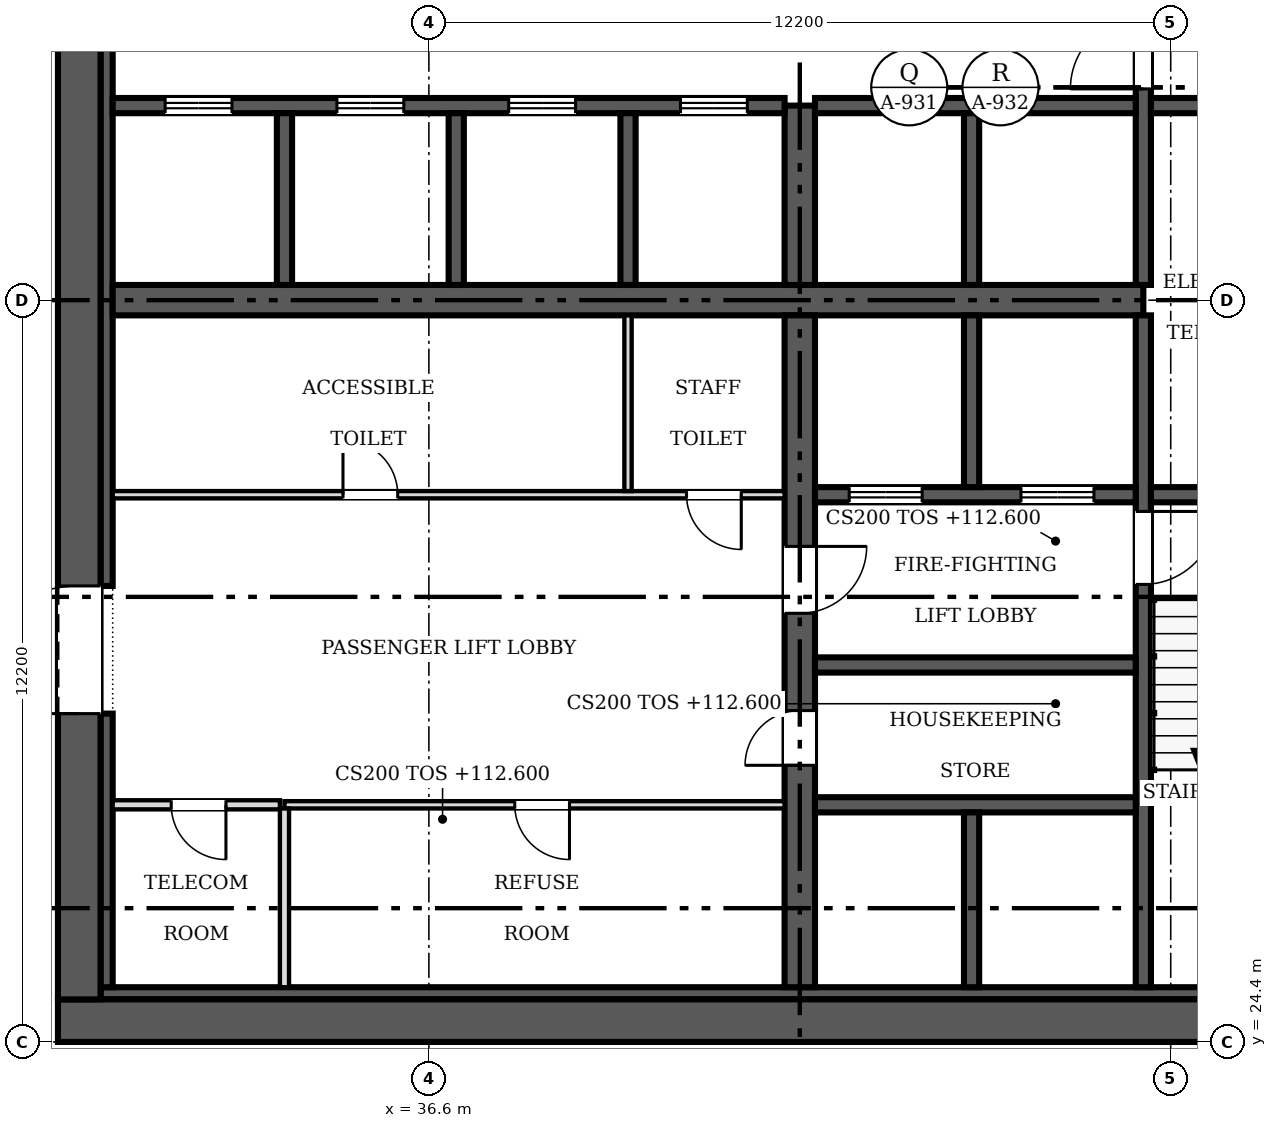
"""IFC4 building model, lengths in metres.
Left out: names, types, materials, properties, quantities, classifications, styles, units other than length and angle.
Written with IfcOpenShell. Run it as: python <this file> out.ifc"""

import sys

from ifc_helpers import new_model, si_unit, direction, frame, frame_2d, origin, place, context, subcontext, project, spatial, rectangle, extrude, source, transform, mapped, element, fill, save


model = new_model("IFC4")
c1 = context("Model", 3, precision=1e-05, world=origin(), true_north=direction((0.0, 1.0)))
c2 = subcontext(c1, "Body", "Model", "MODEL_VIEW")
j1 = project(units=[si_unit("LENGTHUNIT", "METRE"), si_unit("PLANEANGLEUNIT", "RADIAN")], contexts=[c1])
p1 = place(None, origin())
s1 = spatial("IfcSite", under=j1, at=p1, CompositionType="ELEMENT")
p2 = place(p1, origin())
s2 = spatial("IfcBuilding", under=s1, at=p2, CompositionType="ELEMENT")
p3 = place(p2, frame((0.0, 0.0, 112.6)))
s3 = spatial("IfcBuildingStorey", under=s2, at=p3, CompositionType="ELEMENT", Elevation=112.6)
p4 = place(p3, frame((54.9, 24.75, 0.0), z_axis=(0.0, 0.0, 1.0), x_axis=(-1.0, 0.0, 0.0)))
e1 = element("IfcWall", 1, at=p4, inside=s3, PredefinedType="SHEAR", context=c2, shape_type="SweptSolid", body=[
    extrude(rectangle(XDim=24.4, YDim=0.7, at=frame_2d((12.2, 0.0))), origin(), (0.0, 0.0, 1.0), 3.8),
])
m1 = source(origin(), c2, "Body", "SweptSolid", [
    extrude(rectangle(XDim=1.2, YDim=2.1, at=frame_2d((0.6, 1.05))), frame((0.0, 0.36, 0.0), z_axis=(0.0, -1.0, 0.0), x_axis=(1.0, 0.0, 0.0)), (0.0, 0.0, 1.0), 0.72),
])
p5 = place(p4, frame((1.5, 0.0, 0.0)))
e2 = element("IfcOpeningElement", 2, at=p5, cuts=e1, PredefinedType="OPENING", context=c2, shape_type="MappedRepresentation", body=[
    mapped(m1, transform((0.0, 0.0, 0.0), scale=1.0)),
])
p6 = place(p3, frame((30.85, 25.1, 0.0), z_axis=(0.0, 0.0, 1.0), x_axis=(0.0, 1.0, 0.0)))
e3 = element("IfcWall", 3, at=p6, inside=s3, PredefinedType="SHEAR", context=c2, shape_type="SweptSolid", body=[
    extrude(rectangle(XDim=23.0, YDim=0.7, at=frame_2d((11.5, 0.0))), origin(), (0.0, 0.0, 1.0), 3.8),
])
m2 = source(origin(), c2, "Body", "SweptSolid", [
    extrude(rectangle(XDim=2.1, YDim=2.4, at=frame_2d((1.05, 1.2))), frame((0.0, 0.36, 0.0), z_axis=(0.0, -1.0, 0.0), x_axis=(1.0, 0.0, 0.0)), (0.0, 0.0, 1.0), 0.72),
])
p7 = place(p6, frame((4.7, 0.0, 0.0)))
e4 = element("IfcOpeningElement", 4, at=p7, cuts=e3, PredefinedType="OPENING", context=c2, shape_type="MappedRepresentation", body=[
    mapped(m2, transform((0.0, 0.0, 0.0), scale=1.0)),
])
p8 = place(p6, frame((16.2, 0.0, 0.0)))
e5 = element("IfcOpeningElement", 5, at=p8, cuts=e3, PredefinedType="OPENING", context=c2, shape_type="MappedRepresentation", body=[
    mapped(m2, transform((0.0, 0.0, 0.0), scale=1.0)),
])
p9 = place(p3, frame((31.2, 25.2, 0.0), z_axis=(0.0, 0.0, 1.0), x_axis=(1.0, 0.0, 0.0)))
e6 = element("IfcWall", 6, at=p9, inside=s3, PredefinedType="SOLIDWALL", context=c2, shape_type="SweptSolid", body=[
    extrude(rectangle(XDim=21.0, YDim=0.2, at=frame_2d((10.5, 0.0))), origin(), (0.0, 0.0, 1.0), 3.8),
])
p10 = place(p3, frame((31.3, 25.3, 0.0), z_axis=(0.0, 0.0, 1.0), x_axis=(0.0, 1.0, 0.0)))
e7 = element("IfcWall", 7, at=p10, inside=s3, PredefinedType="SOLIDWALL", context=c2, shape_type="SweptSolid", body=[
    extrude(rectangle(XDim=4.5, YDim=0.2, at=frame_2d((2.25, 0.0))), origin(), (0.0, 0.0, 1.0), 3.8),
])
p11 = place(p3, frame((31.3, 31.9, 0.0), z_axis=(0.0, 0.0, 1.0), x_axis=(0.0, 1.0, 0.0)))
e8 = element("IfcWall", 8, at=p11, inside=s3, PredefinedType="SOLIDWALL", context=c2, shape_type="SweptSolid", body=[
    extrude(rectangle(XDim=9.4, YDim=0.2, at=frame_2d((4.7, 0.0))), origin(), (0.0, 0.0, 1.0), 3.8),
])
p12 = place(p3, frame((31.4, 36.6, 0.0), z_axis=(0.0, 0.0, 1.0), x_axis=(1.0, 0.0, 0.0)))
e9 = element("IfcWall", 9, at=p12, inside=s3, PredefinedType="SHEAR", context=c2, shape_type="SweptSolid", body=[
    extrude(rectangle(XDim=16.95, YDim=0.5, at=frame_2d((8.475, 0.0))), origin(), (0.0, 0.0, 1.0), 3.8),
])
p13 = place(p3, frame((42.7, 36.35, 0.0), z_axis=(0.0, 0.0, 1.0), x_axis=(0.0, -1.0, 0.0)))
e10 = element("IfcWall", 10, at=p13, inside=s3, PredefinedType="SHEAR", context=c2, shape_type="SweptSolid", body=[
    extrude(rectangle(XDim=11.05, YDim=0.5, at=frame_2d((5.525, 0.0))), origin(), (0.0, 0.0, 1.0), 3.8),
])
m3 = source(origin(), c2, "Body", "SweptSolid", [
    extrude(rectangle(XDim=0.9, YDim=2.1, at=frame_2d((0.45, 1.05))), frame((0.0, 0.26, 0.0), z_axis=(0.0, -1.0, 0.0), x_axis=(1.0, 0.0, 0.0)), (0.0, 0.0, 1.0), 0.52),
])
p14 = place(p13, frame((6.5, 0.0, 0.0)))
e11 = element("IfcOpeningElement", 11, at=p14, cuts=e10, PredefinedType="OPENING", context=c2, shape_type="MappedRepresentation", body=[
    mapped(m3, transform((0.0, 0.0, 0.0), scale=1.0)),
])
m4 = source(origin(), c2, "Body", "SweptSolid", [
    extrude(rectangle(XDim=1.1, YDim=2.1, at=frame_2d((0.55, 1.05))), frame((0.0, 0.26, 0.0), z_axis=(0.0, -1.0, 0.0), x_axis=(1.0, 0.0, 0.0)), (0.0, 0.0, 1.0), 0.52),
])
p15 = place(p13, frame((3.8, 0.0, 0.0)))
e12 = element("IfcOpeningElement", 12, at=p15, cuts=e10, PredefinedType="OPENING", context=c2, shape_type="MappedRepresentation", body=[
    mapped(m4, transform((0.0, 0.0, 0.0), scale=1.0)),
])
p16 = place(p3, frame((42.7, 36.85, 0.0), z_axis=(0.0, 0.0, 1.0), x_axis=(0.0, 1.0, 0.0)))
e13 = element("IfcWall", 13, at=p16, inside=s3, PredefinedType="SHEAR", context=c2, shape_type="SweptSolid", body=[
    extrude(rectangle(XDim=2.95, YDim=0.5, at=frame_2d((1.475, 0.0))), origin(), (0.0, 0.0, 1.0), 3.8),
])
p17 = place(p3, frame((48.35, 36.35, 0.0), z_axis=(0.0, 0.0, 1.0), x_axis=(0.0, -1.0, 0.0)))
e14 = element("IfcWall", 14, at=p17, inside=s3, PredefinedType="SOLIDWALL", context=c2, shape_type="SweptSolid", body=[
    extrude(rectangle(XDim=11.05, YDim=0.25, at=frame_2d((5.525, 0.0))), origin(), (0.0, 0.0, 1.0), 3.8),
])
m5 = source(origin(), c2, "Body", "SweptSolid", [
    extrude(rectangle(XDim=1.2, YDim=2.1, at=frame_2d((0.6, 1.05))), frame((0.0, 0.135, 0.0), z_axis=(0.0, -1.0, 0.0), x_axis=(1.0, 0.0, 0.0)), (0.0, 0.0, 1.0), 0.27),
])
p18 = place(p17, frame((3.225, 0.0, 0.0)))
e15 = element("IfcOpeningElement", 15, at=p18, cuts=e14, PredefinedType="OPENING", context=c2, shape_type="MappedRepresentation", body=[
    mapped(m5, transform((0.0, 0.0, 0.0), scale=1.0)),
])
p19 = place(p3, frame((48.35, 47.9, 0.0), z_axis=(0.0, 0.0, 1.0), x_axis=(0.0, -1.0, 0.0)))
e16 = element("IfcWall", 16, at=p19, inside=s3, PredefinedType="SOLIDWALL", context=c2, shape_type="SweptSolid", body=[
    extrude(rectangle(XDim=11.05, YDim=0.25, at=frame_2d((5.525, 0.0))), origin(), (0.0, 0.0, 1.0), 3.8),
])
p20 = place(p19, frame((6.625, 0.0, 0.0)))
e17 = element("IfcOpeningElement", 17, at=p20, cuts=e16, PredefinedType="OPENING", context=c2, shape_type="MappedRepresentation", body=[
    mapped(m5, transform((0.0, 0.0, 0.0), scale=1.0)),
])
p21 = place(p3, frame((31.4, 39.8, 0.0), z_axis=(0.0, 0.0, 1.0), x_axis=(1.0, 0.0, 0.0)))
e18 = element("IfcWall", 18, at=p21, inside=s3, PredefinedType="SOLIDWALL", context=c2, shape_type="SweptSolid", body=[
    extrude(rectangle(XDim=11.05, YDim=0.25, at=frame_2d((5.525, 0.0))), origin(), (0.0, 0.0, 1.0), 3.8),
])
m6 = source(origin(), c2, "Body", "SweptSolid", [
    extrude(rectangle(XDim=1.1, YDim=2.1, at=frame_2d((0.55, 1.05))), frame((0.0, 0.135, 0.0), z_axis=(0.0, -1.0, 0.0), x_axis=(1.0, 0.0, 0.0)), (0.0, 0.0, 1.0), 0.27),
])
p22 = place(p21, frame((0.863, 0.0, 0.0)))
e19 = element("IfcOpeningElement", 19, at=p22, cuts=e18, PredefinedType="OPENING", context=c2, shape_type="MappedRepresentation", body=[
    mapped(m6, transform((0.0, 0.0, 0.0), scale=1.0)),
])
p23 = place(p21, frame((3.688, 0.0, 0.0)))
e20 = element("IfcOpeningElement", 20, at=p23, cuts=e18, PredefinedType="OPENING", context=c2, shape_type="MappedRepresentation", body=[
    mapped(m6, transform((0.0, 0.0, 0.0), scale=1.0)),
])
p24 = place(p21, frame((6.512, 0.0, 0.0)))
e21 = element("IfcOpeningElement", 21, at=p24, cuts=e18, PredefinedType="OPENING", context=c2, shape_type="MappedRepresentation", body=[
    mapped(m6, transform((0.0, 0.0, 0.0), scale=1.0)),
])
p25 = place(p21, frame((9.337, 0.0, 0.0)))
e22 = element("IfcOpeningElement", 22, at=p25, cuts=e18, PredefinedType="OPENING", context=c2, shape_type="MappedRepresentation", body=[
    mapped(m6, transform((0.0, 0.0, 0.0), scale=1.0)),
])
p26 = place(p3, frame((42.95, 39.8, 0.0), z_axis=(0.0, 0.0, 1.0), x_axis=(1.0, 0.0, 0.0)))
e23 = element("IfcWall", 23, at=p26, inside=s3, PredefinedType="SOLIDWALL", context=c2, shape_type="SweptSolid", body=[
    extrude(rectangle(XDim=5.275, YDim=0.25, at=frame_2d((2.638, 0.0))), origin(), (0.0, 0.0, 1.0), 3.6),
])
p27 = place(p3, frame((48.475, 39.8, 0.0), z_axis=(0.0, 0.0, 1.0), x_axis=(1.0, 0.0, 0.0)))
e24 = element("IfcWall", 24, at=p27, inside=s3, PredefinedType="SOLIDWALL", context=c2, shape_type="SweptSolid", body=[
    extrude(rectangle(XDim=3.525, YDim=0.25, at=frame_2d((1.762, 0.0))), origin(), (0.0, 0.0, 1.0), 3.8),
])
p28 = place(p3, frame((48.225, 33.4, 0.0), z_axis=(0.0, 0.0, 1.0), x_axis=(-1.0, 0.0, 0.0)))
e25 = element("IfcWall", 25, at=p28, inside=s3, PredefinedType="SOLIDWALL", context=c2, shape_type="SweptSolid", body=[
    extrude(rectangle(XDim=5.275, YDim=0.25, at=frame_2d((2.638, 0.0))), origin(), (0.0, 0.0, 1.0), 3.8),
])
p29 = place(p28, frame((3.512, 0.0, 0.0)))
e26 = element("IfcOpeningElement", 26, at=p29, cuts=e25, PredefinedType="OPENING", context=c2, shape_type="MappedRepresentation", body=[
    mapped(m5, transform((0.0, 0.0, 0.0), scale=1.0)),
])
p30 = place(p28, frame((0.688, 0.0, 0.0)))
e27 = element("IfcOpeningElement", 27, at=p30, cuts=e25, PredefinedType="OPENING", context=c2, shape_type="MappedRepresentation", body=[
    mapped(m5, transform((0.0, 0.0, 0.0), scale=1.0)),
])
p31 = place(p3, frame((48.475, 33.4, 0.0), z_axis=(0.0, 0.0, 1.0), x_axis=(1.0, 0.0, 0.0)))
e28 = element("IfcWall", 28, at=p31, inside=s3, PredefinedType="SOLIDWALL", context=c2, shape_type="SweptSolid", body=[
    extrude(rectangle(XDim=3.525, YDim=0.25, at=frame_2d((1.762, 0.0))), origin(), (0.0, 0.0, 1.0), 3.8),
])
p32 = place(p3, frame((45.525, 33.525, 0.0), z_axis=(0.0, 0.0, 1.0), x_axis=(0.0, 1.0, 0.0)))
e29 = element("IfcWall", 29, at=p32, inside=s3, PredefinedType="SOLIDWALL", context=c2, shape_type="SweptSolid", body=[
    extrude(rectangle(XDim=2.825, YDim=0.25, at=frame_2d((1.413, 0.0))), origin(), (0.0, 0.0, 1.0), 3.8),
])
p33 = place(p3, frame((45.525, 36.85, 0.0), z_axis=(0.0, 0.0, 1.0), x_axis=(0.0, 1.0, 0.0)))
e30 = element("IfcWall", 30, at=p33, inside=s3, PredefinedType="SOLIDWALL", context=c2, shape_type="SweptSolid", body=[
    extrude(rectangle(XDim=2.825, YDim=0.25, at=frame_2d((1.413, 0.0))), origin(), (0.0, 0.0, 1.0), 3.6),
])
for number, where, z_axis, x_axis in (
    (31, (42.95, 28.3, 0.0), (0.0, 0.0, 1.0), (1.0, 0.0, 0.0)),
    (32, (42.95, 30.6, 0.0), (0.0, 0.0, 1.0), (1.0, 0.0, 0.0)),
):
    element("IfcWall", number, at=place(p3, frame(where, z_axis=z_axis, x_axis=x_axis)), inside=s3, PredefinedType="SOLIDWALL", context=c2, shape_type="SweptSolid", body=[
        extrude(rectangle(XDim=5.275, YDim=0.25, at=frame_2d((2.638, 0.0))), origin(), (0.0, 0.0, 1.0), 3.8),
    ])
for number, where, z_axis, x_axis in (
    (33, (34.225, 36.85, 0.0), (0.0, 0.0, 1.0), (0.0, 1.0, 0.0)),
    (34, (37.05, 36.85, 0.0), (0.0, 0.0, 1.0), (0.0, 1.0, 0.0)),
    (35, (39.875, 36.85, 0.0), (0.0, 0.0, 1.0), (0.0, 1.0, 0.0)),
):
    element("IfcWall", number, at=place(p3, frame(where, z_axis=z_axis, x_axis=x_axis)), inside=s3, PredefinedType="SOLIDWALL", context=c2, shape_type="SweptSolid", body=[
        extrude(rectangle(XDim=2.825, YDim=0.25, at=frame_2d((1.413, 0.0))), origin(), (0.0, 0.0, 1.0), 3.8),
    ])
p34 = place(p3, frame((45.525, 25.3, 0.0), z_axis=(0.0, 0.0, 1.0), x_axis=(0.0, 1.0, 0.0)))
e36 = element("IfcWall", 36, at=p34, inside=s3, PredefinedType="SOLIDWALL", context=c2, shape_type="SweptSolid", body=[
    extrude(rectangle(XDim=2.875, YDim=0.25, at=frame_2d((1.438, 0.0))), origin(), (0.0, 0.0, 1.0), 3.8),
])
p35 = place(p3, frame((31.4, 33.4, 0.0), z_axis=(0.0, 0.0, 1.0), x_axis=(1.0, 0.0, 0.0)))
e37 = element("IfcWall", 37, at=p35, inside=s3, PredefinedType="PARTITIONING", context=c2, shape_type="SweptSolid", body=[
    extrude(rectangle(XDim=11.05, YDim=0.12, at=frame_2d((5.525, 0.0))), origin(), (0.0, 0.0, 1.0), 3.6),
])
m7 = source(origin(), c2, "Body", "SweptSolid", [
    extrude(rectangle(XDim=0.9, YDim=2.1, at=frame_2d((0.45, 1.05))), frame((0.0, 0.07, 0.0), z_axis=(0.0, -1.0, 0.0), x_axis=(1.0, 0.0, 0.0)), (0.0, 0.0, 1.0), 0.14),
])
p36 = place(p35, frame((3.788, 0.0, 0.0)))
e38 = element("IfcOpeningElement", 38, at=p36, cuts=e37, PredefinedType="OPENING", context=c2, shape_type="MappedRepresentation", body=[
    mapped(m7, transform((0.0, 0.0, 0.0), scale=1.0)),
])
p37 = place(p35, frame((9.438, 0.0, 0.0)))
e39 = element("IfcOpeningElement", 39, at=p37, cuts=e37, PredefinedType="OPENING", context=c2, shape_type="MappedRepresentation", body=[
    mapped(m7, transform((0.0, 0.0, 0.0), scale=1.0)),
])
p38 = place(p3, frame((42.45, 28.3, 0.0), z_axis=(0.0, 0.0, 1.0), x_axis=(-1.0, 0.0, 0.0)))
e40 = element("IfcWall", 40, at=p38, inside=s3, PredefinedType="PARTITIONING", context=c2, shape_type="SweptSolid", body=[
    extrude(rectangle(XDim=8.225, YDim=0.12, at=frame_2d((4.112, 0.0))), origin(), (0.0, 0.0, 1.0), 3.6),
])
p39 = place(p38, frame((3.538, 0.0, 0.0)))
e41 = element("IfcOpeningElement", 41, at=p39, cuts=e40, PredefinedType="OPENING", context=c2, shape_type="MappedRepresentation", body=[
    mapped(m7, transform((0.0, 0.0, 0.0), scale=1.0)),
])
p40 = place(p3, frame((39.875, 33.46, 0.0), z_axis=(0.0, 0.0, 1.0), x_axis=(0.0, 1.0, 0.0)))
e42 = element("IfcWall", 42, at=p40, inside=s3, PredefinedType="PARTITIONING", context=c2, shape_type="SweptSolid", body=[
    extrude(rectangle(XDim=2.89, YDim=0.12, at=frame_2d((1.445, 0.0))), origin(), (0.0, 0.0, 1.0), 3.6),
])
p41 = place(p3, frame((34.225, 25.3, 0.0), z_axis=(0.0, 0.0, 1.0), x_axis=(0.0, 1.0, 0.0)))
e43 = element("IfcWall", 43, at=p41, inside=s3, PredefinedType="PARTITIONING", context=c2, shape_type="SweptSolid", body=[
    extrude(rectangle(XDim=2.94, YDim=0.15, at=frame_2d((1.47, 0.0))), origin(), (0.0, 0.0, 1.0), 3.6),
])
p42 = place(p3, frame((34.15, 28.3, 0.0), z_axis=(0.0, 0.0, 1.0), x_axis=(-1.0, 0.0, 0.0)))
e44 = element("IfcWall", 44, at=p42, inside=s3, PredefinedType="PARTITIONING", context=c2, shape_type="SweptSolid", body=[
    extrude(rectangle(XDim=2.75, YDim=0.15, at=frame_2d((1.375, 0.0))), origin(), (0.0, 0.0, 1.0), 3.6),
])
m8 = source(origin(), c2, "Body", "SweptSolid", [
    extrude(rectangle(XDim=0.9, YDim=2.1, at=frame_2d((0.45, 1.05))), frame((0.0, 0.085, 0.0), z_axis=(0.0, -1.0, 0.0), x_axis=(1.0, 0.0, 0.0)), (0.0, 0.0, 1.0), 0.17),
])
p43 = place(p42, frame((0.887, 0.0, 0.0)))
e45 = element("IfcOpeningElement", 45, at=p43, cuts=e44, PredefinedType="OPENING", context=c2, shape_type="MappedRepresentation", body=[
    mapped(m8, transform((0.0, 0.0, 0.0), scale=1.0)),
])
m9 = source(origin(), c2, "Body", "SweptSolid", [
    extrude(rectangle(XDim=2.1, YDim=2.4, at=frame_2d((1.05, 1.2))), frame((0.0, 0.025, 0.0), z_axis=(0.0, -1.0, 0.0), x_axis=(1.0, 0.0, 0.0)), (0.0, 0.0, 1.0), 0.05),
])
p44 = place(p7, origin())
e46 = element("IfcDoor", 46, at=p44, inside=s3, OperationType="DOUBLE_DOOR_SINGLE_SWING", PredefinedType="DOOR", context=c2, shape_type="MappedRepresentation", body=[
    mapped(m9, transform((0.0, 0.0, 0.0), scale=1.0)),
])
fill(e4, e46)
m10 = source(origin(), c2, "Body", "SweptSolid", [
    extrude(rectangle(XDim=0.9, YDim=2.1, at=frame_2d((0.45, 1.05))), frame((0.0, 0.025, 0.0), z_axis=(0.0, -1.0, 0.0), x_axis=(1.0, 0.0, 0.0)), (0.0, 0.0, 1.0), 0.05),
])
p45 = place(p14, origin())
e47 = element("IfcDoor", 47, at=p45, inside=s3, OperationType="SINGLE_SWING_RIGHT", PredefinedType="DOOR", context=c2, shape_type="MappedRepresentation", body=[
    mapped(m10, transform((0.0, 0.0, 0.0), scale=1.0)),
])
fill(e11, e47)
m11 = source(origin(), c2, "Body", "SweptSolid", [
    extrude(rectangle(XDim=1.1, YDim=2.1, at=frame_2d((0.55, 1.05))), frame((0.0, 0.025, 0.0), z_axis=(0.0, -1.0, 0.0), x_axis=(1.0, 0.0, 0.0)), (0.0, 0.0, 1.0), 0.05),
])
p46 = place(p15, origin())
e48 = element("IfcDoor", 48, at=p46, inside=s3, OperationType="SINGLE_SWING_LEFT", PredefinedType="DOOR", context=c2, shape_type="MappedRepresentation", body=[
    mapped(m11, transform((0.0, 0.0, 0.0), scale=1.0)),
])
fill(e12, e48)
m12 = source(origin(), c2, "Body", "SweptSolid", [
    extrude(rectangle(XDim=1.2, YDim=2.1, at=frame_2d((0.6, 1.05))), frame((0.0, 0.025, 0.0), z_axis=(0.0, -1.0, 0.0), x_axis=(1.0, 0.0, 0.0)), (0.0, 0.0, 1.0), 0.05),
])
p47 = place(p18, origin())
e49 = element("IfcDoor", 49, at=p47, inside=s3, OperationType="SINGLE_SWING_LEFT", PredefinedType="DOOR", context=c2, shape_type="MappedRepresentation", body=[
    mapped(m12, transform((0.0, 0.0, 0.0), scale=1.0)),
])
fill(e15, e49)
p48 = place(p20, origin())
e50 = element("IfcDoor", 50, at=p48, inside=s3, OperationType="SINGLE_SWING_RIGHT", PredefinedType="DOOR", context=c2, shape_type="MappedRepresentation", body=[
    mapped(m12, transform((0.0, 0.0, 0.0), scale=1.0)),
])
fill(e17, e50)
p49 = place(p22, origin())
e51 = element("IfcDoor", 51, at=p49, inside=s3, OperationType="DOUBLE_DOOR_SLIDING", PredefinedType="DOOR", context=c2, shape_type="MappedRepresentation", body=[
    mapped(m11, transform((0.0, 0.0, 0.0), scale=1.0)),
])
fill(e19, e51)
p50 = place(p23, origin())
e52 = element("IfcDoor", 52, at=p50, inside=s3, OperationType="DOUBLE_DOOR_SLIDING", PredefinedType="DOOR", context=c2, shape_type="MappedRepresentation", body=[
    mapped(m11, transform((0.0, 0.0, 0.0), scale=1.0)),
])
fill(e20, e52)
p51 = place(p24, origin())
e53 = element("IfcDoor", 53, at=p51, inside=s3, OperationType="DOUBLE_DOOR_SLIDING", PredefinedType="DOOR", context=c2, shape_type="MappedRepresentation", body=[
    mapped(m11, transform((0.0, 0.0, 0.0), scale=1.0)),
])
fill(e21, e53)
p52 = place(p25, origin())
e54 = element("IfcDoor", 54, at=p52, inside=s3, OperationType="DOUBLE_DOOR_SLIDING", PredefinedType="DOOR", context=c2, shape_type="MappedRepresentation", body=[
    mapped(m11, transform((0.0, 0.0, 0.0), scale=1.0)),
])
fill(e22, e54)
p53 = place(p29, origin())
e55 = element("IfcDoor", 55, at=p53, inside=s3, OperationType="DOUBLE_DOOR_SLIDING", PredefinedType="DOOR", context=c2, shape_type="MappedRepresentation", body=[
    mapped(m12, transform((0.0, 0.0, 0.0), scale=1.0)),
])
fill(e26, e55)
p54 = place(p30, origin())
e56 = element("IfcDoor", 56, at=p54, inside=s3, OperationType="DOUBLE_DOOR_SLIDING", PredefinedType="DOOR", context=c2, shape_type="MappedRepresentation", body=[
    mapped(m12, transform((0.0, 0.0, 0.0), scale=1.0)),
])
fill(e27, e56)
p55 = place(p36, origin())
e57 = element("IfcDoor", 57, at=p55, inside=s3, OperationType="SINGLE_SWING_LEFT", PredefinedType="DOOR", context=c2, shape_type="MappedRepresentation", body=[
    mapped(m10, transform((0.0, 0.0, 0.0), scale=1.0)),
])
fill(e38, e57)
p56 = place(p37, origin())
e58 = element("IfcDoor", 58, at=p56, inside=s3, OperationType="SINGLE_SWING_RIGHT", PredefinedType="DOOR", context=c2, shape_type="MappedRepresentation", body=[
    mapped(m10, transform((0.0, 0.0, 0.0), scale=1.0)),
])
fill(e39, e58)
p57 = place(p39, origin())
e59 = element("IfcDoor", 59, at=p57, inside=s3, OperationType="SINGLE_SWING_LEFT", PredefinedType="DOOR", context=c2, shape_type="MappedRepresentation", body=[
    mapped(m10, transform((0.0, 0.0, 0.0), scale=1.0)),
])
fill(e41, e59)
p58 = place(p43, origin())
e60 = element("IfcDoor", 60, at=p58, inside=s3, OperationType="SINGLE_SWING_LEFT", PredefinedType="DOOR", context=c2, shape_type="MappedRepresentation", body=[
    mapped(m10, transform((0.0, 0.0, 0.0), scale=1.0)),
])
fill(e45, e60)
save(model, sys.argv[1])
